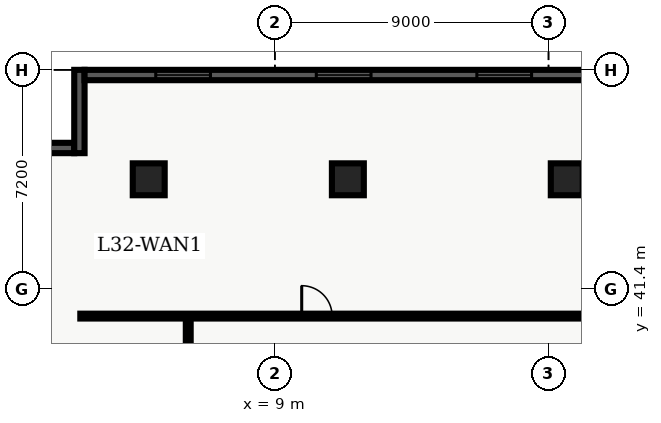
"""IFC4 building model, lengths in metres.
Left out: names, types, materials, properties, quantities, classifications, styles, units other than length and angle.
Written with IfcOpenShell. Run it as: python <this file> out.ifc"""

import sys

from ifc_helpers import new_model, entity, si_unit, converted_unit, direction, frame, origin_with_axes, origin_2d_with_axis, place, context, subcontext, project, spatial, polyline, rectangle, outline, extrude, element, fill, save


model = new_model("IFC4")
c1 = context("Model", 3, precision=1e-05, world=origin_with_axes(), true_north=direction((0.0, 1.0)))
c2 = subcontext(c1, "Body", "Model", "MODEL_VIEW")
j1 = project(units=[si_unit("LENGTHUNIT", "METRE"), converted_unit("PLANEANGLEUNIT", "DEGREE", entity("IfcPlaneAngleMeasure", 0.017), si_unit("PLANEANGLEUNIT", "RADIAN"), dimensions=[0, 0, 0, 0, 0, 0, 0])], contexts=[c1])
p1 = place(None, origin_with_axes())
s1 = spatial("IfcSite", under=j1, at=p1, CompositionType="ELEMENT")
p2 = place(p1, origin_with_axes())
s2 = spatial("IfcBuilding", under=s1, at=p2, CompositionType="ELEMENT")
p3 = place(p2, frame((0.0, 0.0, 132.9), z_axis=(0.0, 0.0, 1.0), x_axis=(1.0, 0.0, 0.0)))
s3 = spatial("IfcBuildingStorey", under=s2, at=p3, CompositionType="ELEMENT", Elevation=132.9)
for number, where, z_axis, x_axis in (
    (1, (11.4, 45.0, 0.0), (0.0, 0.0, 1.0), (1.0, 0.0, 0.0)),
    (2, (18.6, 45.0, 0.0), (0.0, 0.0, 1.0), (1.0, 0.0, 0.0)),
    (3, (4.85, 45.0, 0.0), (0.0, 0.0, 1.0), (1.0, 0.0, 0.0)),
):
    element("IfcColumn", number, at=place(p3, frame(where, z_axis=z_axis, x_axis=x_axis)), inside=s3, PredefinedType="COLUMN", context=c2, shape_type="SweptSolid", body=[
        extrude(rectangle(XDim=1.05, YDim=1.05, at=origin_2d_with_axis()), origin_with_axes(), (0.0, 0.0, 1.0), 3.9),
    ])
p4 = place(p3, frame((2.6, 40.5, 0.0), z_axis=(0.0, 0.0, 1.0), x_axis=(1.0, 0.0, 0.0)))
e4 = element("IfcWall", 4, at=p4, inside=s3, PredefinedType="PARTITIONING", context=c2, shape_type="SweptSolid", body=[
    extrude(outline(polyline([(0.0, -0.08), (18.769, -0.08), (18.769, 0.08), (0.0, 0.08), (0.0, -0.08)])), origin_with_axes(), (0.0, 0.0, 1.0), 2.7),
])
p5 = place(p4, frame((7.782, 0.0, 0.0), z_axis=(0.0, 0.0, 1.0), x_axis=(1.0, 0.0, 0.0)))
e5 = element("IfcOpeningElement", 5, at=p5, cuts=e4, PredefinedType="OPENING", context=c2, shape_type="SweptSolid", body=[
    extrude(rectangle(XDim=1.0, YDim=0.18, at=origin_2d_with_axis()), origin_with_axes(), (0.0, 0.0, 1.0), 2.15),
])
p6 = place(p3, frame((6.15, 7.8, 0.0), z_axis=(0.0, 0.0, 1.0), x_axis=(0.0, 1.0, 0.0)))
e6 = element("IfcWall", 6, at=p6, inside=s3, PredefinedType="PARTITIONING", context=c2, shape_type="SweptSolid", body=[
    extrude(outline(polyline([(0.0, -0.08), (32.7, -0.08), (32.7, 0.08), (0.0, 0.08), (0.0, -0.08)])), origin_with_axes(), (0.0, 0.0, 1.0), 2.7),
])
p7 = place(p6, frame((0.8, 0.0, 0.0), z_axis=(0.0, 0.0, 1.0), x_axis=(1.0, 0.0, 0.0)))
e7 = element("IfcOpeningElement", 7, at=p7, cuts=e6, PredefinedType="OPENING", context=c2, shape_type="SweptSolid", body=[
    extrude(rectangle(XDim=1.0, YDim=0.18, at=origin_2d_with_axis()), origin_with_axes(), (0.0, 0.0, 1.0), 2.15),
])
p8 = place(p6, frame((5.704, 0.0, 0.0), z_axis=(0.0, 0.0, 1.0), x_axis=(1.0, 0.0, 0.0)))
e8 = element("IfcOpeningElement", 8, at=p8, cuts=e6, PredefinedType="OPENING", context=c2, shape_type="SweptSolid", body=[
    extrude(rectangle(XDim=1.0, YDim=0.18, at=origin_2d_with_axis()), origin_with_axes(), (0.0, 0.0, 1.0), 2.15),
])
p9 = place(p6, frame((10.025, 0.0, 0.0), z_axis=(0.0, 0.0, 1.0), x_axis=(1.0, 0.0, 0.0)))
e9 = element("IfcOpeningElement", 9, at=p9, cuts=e6, PredefinedType="OPENING", context=c2, shape_type="SweptSolid", body=[
    extrude(rectangle(XDim=1.0, YDim=0.18, at=origin_2d_with_axis()), origin_with_axes(), (0.0, 0.0, 1.0), 2.15),
])
p10 = place(p6, frame((14.217, 0.0, 0.0), z_axis=(0.0, 0.0, 1.0), x_axis=(1.0, 0.0, 0.0)))
e10 = element("IfcOpeningElement", 10, at=p10, cuts=e6, PredefinedType="OPENING", context=c2, shape_type="SweptSolid", body=[
    extrude(rectangle(XDim=1.0, YDim=0.18, at=origin_2d_with_axis()), origin_with_axes(), (0.0, 0.0, 1.0), 2.15),
])
p11 = place(p6, frame((21.212, 0.0, 0.0), z_axis=(0.0, 0.0, 1.0), x_axis=(1.0, 0.0, 0.0)))
e11 = element("IfcOpeningElement", 11, at=p11, cuts=e6, PredefinedType="OPENING", context=c2, shape_type="SweptSolid", body=[
    extrude(rectangle(XDim=1.0, YDim=0.18, at=origin_2d_with_axis()), origin_with_axes(), (0.0, 0.0, 1.0), 2.15),
])
p12 = place(p6, frame((27.694, 0.0, 0.0), z_axis=(0.0, 0.0, 1.0), x_axis=(1.0, 0.0, 0.0)))
e12 = element("IfcOpeningElement", 12, at=p12, cuts=e6, PredefinedType="OPENING", context=c2, shape_type="SweptSolid", body=[
    extrude(rectangle(XDim=1.0, YDim=0.18, at=origin_2d_with_axis()), origin_with_axes(), (0.0, 0.0, 1.0), 2.15),
])
p13 = place(p3, frame((0.34, 46.03, 0.0), z_axis=(0.0, 0.0, 1.0), x_axis=(1.0, 0.0, 0.0)))
e13 = element("IfcWall", 13, at=p13, inside=s3, PredefinedType="SOLIDWALL", context=c2, shape_type="SweptSolid", body=[
    extrude(outline(polyline([(0.0, -0.17), (2.06, -0.17), (2.06, 0.17), (0.0, 0.17), (0.0, -0.17)])), origin_with_axes(), (0.0, 0.0, 1.0), 3.66),
])
p14 = place(p3, frame((2.57, 45.86, 0.0), z_axis=(0.0, 0.0, 1.0), x_axis=(0.0, 1.0, 0.0)))
e14 = element("IfcWall", 14, at=p14, inside=s3, PredefinedType="SOLIDWALL", context=c2, shape_type="SweptSolid", body=[
    extrude(outline(polyline([(0.0, -0.17), (2.74, -0.17), (2.74, 0.17), (0.0, 0.17), (0.0, -0.17)])), origin_with_axes(), (0.0, 0.0, 1.0), 3.66),
])
p15 = place(p3, frame((2.74, 48.43, 0.0), z_axis=(0.0, 0.0, 1.0), x_axis=(1.0, 0.0, 0.0)))
e15 = element("IfcWall", 15, at=p15, inside=s3, PredefinedType="SOLIDWALL", context=c2, shape_type="SweptSolid", body=[
    extrude(outline(polyline([(0.0, -0.17), (17.044, -0.17), (17.044, 0.17), (0.0, 0.17), (0.0, -0.17)])), origin_with_axes(), (0.0, 0.0, 1.0), 3.66),
])
p16 = place(p15, frame((3.241, 0.0, 0.45), z_axis=(0.0, 0.0, 1.0), x_axis=(1.0, 0.0, 0.0)))
e16 = element("IfcOpeningElement", 16, at=p16, cuts=e15, PredefinedType="OPENING", context=c2, shape_type="SweptSolid", body=[
    extrude(rectangle(XDim=1.8, YDim=0.36, at=origin_2d_with_axis()), origin_with_axes(), (0.0, 0.0, 1.0), 2.1),
])
p17 = place(p15, frame((8.522, 0.0, 0.45), z_axis=(0.0, 0.0, 1.0), x_axis=(1.0, 0.0, 0.0)))
e17 = element("IfcOpeningElement", 17, at=p17, cuts=e15, PredefinedType="OPENING", context=c2, shape_type="SweptSolid", body=[
    extrude(rectangle(XDim=1.8, YDim=0.36, at=origin_2d_with_axis()), origin_with_axes(), (0.0, 0.0, 1.0), 2.1),
])
p18 = place(p15, frame((13.803, 0.0, 0.45), z_axis=(0.0, 0.0, 1.0), x_axis=(1.0, 0.0, 0.0)))
e18 = element("IfcOpeningElement", 18, at=p18, cuts=e15, PredefinedType="OPENING", context=c2, shape_type="SweptSolid", body=[
    extrude(rectangle(XDim=1.8, YDim=0.36, at=origin_2d_with_axis()), origin_with_axes(), (0.0, 0.0, 1.0), 2.1),
])
p19 = place(p4, frame((7.782, 0.0, 0.0), z_axis=(0.0, 0.0, 1.0), x_axis=(1.0, 0.0, 0.0)))
e19 = element("IfcDoor", 19, at=p19, inside=s3, OperationType="SINGLE_SWING_LEFT", PredefinedType="DOOR", context=c2, shape_type="SweptSolid", body=[
    extrude(rectangle(XDim=1.0, YDim=0.09, at=origin_2d_with_axis()), origin_with_axes(), (0.0, 0.0, 1.0), 2.15),
])
fill(e5, e19)
p20 = place(p15, frame((3.241, 0.0, 0.45), z_axis=(0.0, 0.0, 1.0), x_axis=(1.0, 0.0, 0.0)))
e20 = element("IfcWindow", 20, at=p20, inside=s3, PredefinedType="WINDOW", context=c2, shape_type="SweptSolid", body=[
    extrude(rectangle(XDim=1.8, YDim=0.09, at=origin_2d_with_axis()), origin_with_axes(), (0.0, 0.0, 1.0), 2.1),
])
fill(e16, e20)
p21 = place(p15, frame((8.522, 0.0, 0.45), z_axis=(0.0, 0.0, 1.0), x_axis=(1.0, 0.0, 0.0)))
e21 = element("IfcWindow", 21, at=p21, inside=s3, PredefinedType="WINDOW", context=c2, shape_type="SweptSolid", body=[
    extrude(rectangle(XDim=1.8, YDim=0.09, at=origin_2d_with_axis()), origin_with_axes(), (0.0, 0.0, 1.0), 2.1),
])
fill(e17, e21)
p22 = place(p15, frame((13.803, 0.0, 0.45), z_axis=(0.0, 0.0, 1.0), x_axis=(1.0, 0.0, 0.0)))
e22 = element("IfcWindow", 22, at=p22, inside=s3, PredefinedType="WINDOW", context=c2, shape_type="SweptSolid", body=[
    extrude(rectangle(XDim=1.8, YDim=0.09, at=origin_2d_with_axis()), origin_with_axes(), (0.0, 0.0, 1.0), 2.1),
])
fill(e18, e22)
save(model, sys.argv[1])
